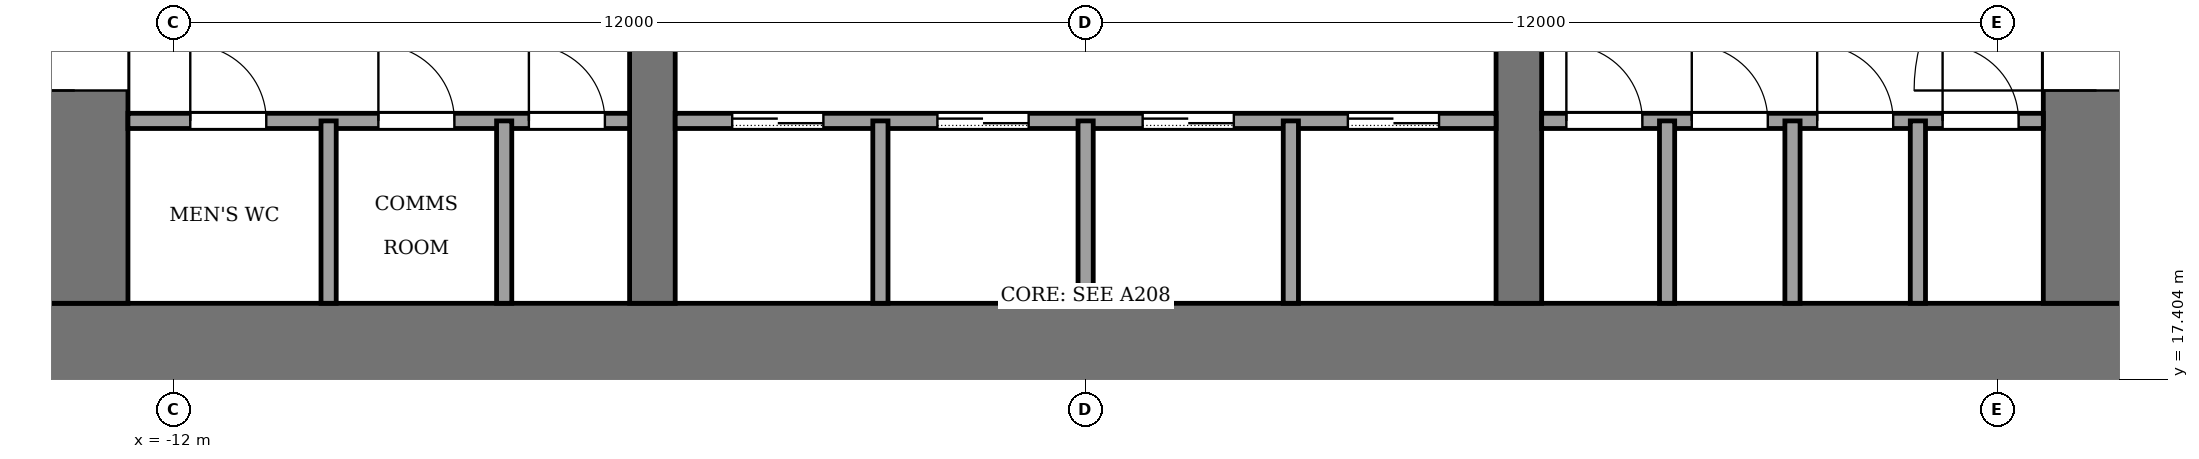
"""IFC4 building model, lengths in metres.
Left out: names, types, materials, properties, quantities, classifications, styles, units other than length and angle.
Written with IfcOpenShell. Run it as: python <this file> out.ifc"""

import sys

from ifc_helpers import new_model, si_unit, direction, frame, frame_2d, origin, place, context, subcontext, project, spatial, rectangle, extrude, element, fill, save


model = new_model("IFC4")
c1 = context("Model", 3, precision=1e-05, world=origin(), true_north=direction((0.0, 1.0)))
c2 = subcontext(c1, "Body", "Model", "MODEL_VIEW")
j1 = project(units=[si_unit("LENGTHUNIT", "METRE"), si_unit("PLANEANGLEUNIT", "RADIAN")], contexts=[c1])
p1 = place(None, origin())
s1 = spatial("IfcSite", under=j1, at=p1, CompositionType="ELEMENT")
p2 = place(p1, origin())
s2 = spatial("IfcBuilding", under=s1, at=p2, CompositionType="ELEMENT")
p3 = place(p2, frame((0.0, 0.0, 42.0)))
s3 = spatial("IfcBuildingStorey", under=s2, at=p3, CompositionType="ELEMENT", Elevation=42.0)
p4 = place(p3, frame((-14.0, 17.7, -0.13), z_axis=(0.0, 0.0, 1.0), x_axis=(1.0, 0.0, 0.0)))
e1 = element("IfcWall", 1, at=p4, inside=s3, PredefinedType="SHEAR", context=c2, shape_type="SweptSolid", body=[
    extrude(rectangle(XDim=28.0, YDim=1.4, at=frame_2d((14.0, 0.0))), origin(), (0.0, 0.0, 1.0), 4.0),
])
p5 = place(p3, frame((-13.3, 18.4, -0.13), z_axis=(0.0, 0.0, 1.0), x_axis=(0.0, 1.0, 0.0)))
e2 = element("IfcWall", 2, at=p5, inside=s3, PredefinedType="SHEAR", context=c2, shape_type="SweptSolid", body=[
    extrude(rectangle(XDim=19.2, YDim=1.4, at=frame_2d((9.6, 0.0))), origin(), (0.0, 0.0, 1.0), 4.0),
])
p6 = place(p5, frame((2.8, 0.0, 0.13)))
e3 = element("IfcOpeningElement", 3, at=p6, cuts=e2, PredefinedType="OPENING", context=c2, shape_type="SweptSolid", body=[
    extrude(rectangle(XDim=2.4, YDim=2.4, at=frame_2d((1.2, 1.2))), frame((0.0, 0.71, 0.0), z_axis=(0.0, -1.0, 0.0), x_axis=(1.0, 0.0, 0.0)), (0.0, 0.0, 1.0), 1.42),
])
p7 = place(p5, frame((13.4, 0.0, 0.13)))
e4 = element("IfcOpeningElement", 4, at=p7, cuts=e2, PredefinedType="OPENING", context=c2, shape_type="SweptSolid", body=[
    extrude(rectangle(XDim=1.4, YDim=2.2, at=frame_2d((0.7, 1.1))), frame((0.0, 0.71, 0.0), z_axis=(0.0, -1.0, 0.0), x_axis=(1.0, 0.0, 0.0)), (0.0, 0.0, 1.0), 1.42),
])
p8 = place(p3, frame((13.3, 18.4, -0.13), z_axis=(0.0, 0.0, 1.0), x_axis=(0.0, 1.0, 0.0)))
e5 = element("IfcWall", 5, at=p8, inside=s3, PredefinedType="SHEAR", context=c2, shape_type="SweptSolid", body=[
    extrude(rectangle(XDim=19.2, YDim=1.4, at=frame_2d((9.6, 0.0))), origin(), (0.0, 0.0, 1.0), 4.0),
])
p9 = place(p8, frame((2.8, 0.0, 0.13)))
e6 = element("IfcOpeningElement", 6, at=p9, cuts=e5, PredefinedType="OPENING", context=c2, shape_type="SweptSolid", body=[
    extrude(rectangle(XDim=2.4, YDim=2.4, at=frame_2d((1.2, 1.2))), frame((0.0, 0.71, 0.0), z_axis=(0.0, -1.0, 0.0), x_axis=(1.0, 0.0, 0.0)), (0.0, 0.0, 1.0), 1.42),
])
p10 = place(p8, frame((13.3, 0.0, 0.13)))
e7 = element("IfcOpeningElement", 7, at=p10, cuts=e5, PredefinedType="OPENING", context=c2, shape_type="SweptSolid", body=[
    extrude(rectangle(XDim=2.4, YDim=2.4, at=frame_2d((1.2, 1.2))), frame((0.0, 0.71, 0.0), z_axis=(0.0, -1.0, 0.0), x_axis=(1.0, 0.0, 0.0)), (0.0, 0.0, 1.0), 1.42),
])
p11 = place(p3, frame((-5.7, 18.4, -0.13), z_axis=(0.0, 0.0, 1.0), x_axis=(0.0, 1.0, 0.0)))
e8 = element("IfcWall", 8, at=p11, inside=s3, PredefinedType="SHEAR", context=c2, shape_type="SweptSolid", body=[
    extrude(rectangle(XDim=19.2, YDim=0.6, at=frame_2d((9.6, 0.0))), origin(), (0.0, 0.0, 1.0), 4.0),
])
p12 = place(p11, frame((8.35, 0.0, 0.13)))
e9 = element("IfcOpeningElement", 9, at=p12, cuts=e8, PredefinedType="OPENING", context=c2, shape_type="SweptSolid", body=[
    extrude(rectangle(XDim=0.9, YDim=2.1, at=frame_2d((0.45, 1.05))), frame((0.0, 0.31, 0.0), z_axis=(0.0, -1.0, 0.0), x_axis=(1.0, 0.0, 0.0)), (0.0, 0.0, 1.0), 0.62),
])
p13 = place(p3, frame((5.7, 18.4, -0.13), z_axis=(0.0, 0.0, 1.0), x_axis=(0.0, 1.0, 0.0)))
e10 = element("IfcWall", 10, at=p13, inside=s3, PredefinedType="SHEAR", context=c2, shape_type="SweptSolid", body=[
    extrude(rectangle(XDim=19.2, YDim=0.6, at=frame_2d((9.6, 0.0))), origin(), (0.0, 0.0, 1.0), 4.0),
])
p14 = place(p13, frame((13.3, 0.0, 0.13)))
e11 = element("IfcOpeningElement", 11, at=p14, cuts=e10, PredefinedType="OPENING", context=c2, shape_type="SweptSolid", body=[
    extrude(rectangle(XDim=2.4, YDim=2.4, at=frame_2d((1.2, 1.2))), frame((0.0, 0.31, 0.0), z_axis=(0.0, -1.0, 0.0), x_axis=(1.0, 0.0, 0.0)), (0.0, 0.0, 1.0), 0.62),
])
p15 = place(p3, frame((-12.6, 20.8, 0.0), z_axis=(0.0, 0.0, 1.0), x_axis=(1.0, 0.0, 0.0)))
e12 = element("IfcWall", 12, at=p15, inside=s3, PredefinedType="PARTITIONING", context=c2, shape_type="SweptSolid", body=[
    extrude(rectangle(XDim=6.6, YDim=0.2, at=frame_2d((3.3, 0.0))), origin(), (0.0, 0.0, 1.0), 3.87),
])
p16 = place(p15, frame((0.82, 0.0, 0.0)))
e13 = element("IfcOpeningElement", 13, at=p16, cuts=e12, PredefinedType="OPENING", context=c2, shape_type="SweptSolid", body=[
    extrude(rectangle(XDim=1.0, YDim=2.1, at=frame_2d((0.5, 1.05))), frame((0.0, 0.11, 0.0), z_axis=(0.0, -1.0, 0.0), x_axis=(1.0, 0.0, 0.0)), (0.0, 0.0, 1.0), 0.22),
])
p17 = place(p15, frame((3.295, 0.0, 0.0)))
e14 = element("IfcOpeningElement", 14, at=p17, cuts=e12, PredefinedType="OPENING", context=c2, shape_type="SweptSolid", body=[
    extrude(rectangle(XDim=1.0, YDim=2.1, at=frame_2d((0.5, 1.05))), frame((0.0, 0.11, 0.0), z_axis=(0.0, -1.0, 0.0), x_axis=(1.0, 0.0, 0.0)), (0.0, 0.0, 1.0), 0.22),
])
p18 = place(p15, frame((5.275, 0.0, 0.0)))
e15 = element("IfcOpeningElement", 15, at=p18, cuts=e12, PredefinedType="OPENING", context=c2, shape_type="SweptSolid", body=[
    extrude(rectangle(XDim=1.0, YDim=2.1, at=frame_2d((0.5, 1.05))), frame((0.0, 0.11, 0.0), z_axis=(0.0, -1.0, 0.0), x_axis=(1.0, 0.0, 0.0)), (0.0, 0.0, 1.0), 0.22),
])
p19 = place(p3, frame((-5.4, 20.8, 0.0), z_axis=(0.0, 0.0, 1.0), x_axis=(1.0, 0.0, 0.0)))
e16 = element("IfcWall", 16, at=p19, inside=s3, PredefinedType="PARTITIONING", context=c2, shape_type="SweptSolid", body=[
    extrude(rectangle(XDim=10.8, YDim=0.2, at=frame_2d((5.4, 0.0))), origin(), (0.0, 0.0, 1.0), 3.87),
])
p20 = place(p19, frame((0.75, 0.0, 0.0)))
e17 = element("IfcOpeningElement", 17, at=p20, cuts=e16, PredefinedType="OPENING", context=c2, shape_type="SweptSolid", body=[
    extrude(rectangle(XDim=1.2, YDim=2.2, at=frame_2d((0.6, 1.1))), frame((0.0, 0.11, 0.0), z_axis=(0.0, -1.0, 0.0), x_axis=(1.0, 0.0, 0.0)), (0.0, 0.0, 1.0), 0.22),
])
p21 = place(p19, frame((3.45, 0.0, 0.0)))
e18 = element("IfcOpeningElement", 18, at=p21, cuts=e16, PredefinedType="OPENING", context=c2, shape_type="SweptSolid", body=[
    extrude(rectangle(XDim=1.2, YDim=2.2, at=frame_2d((0.6, 1.1))), frame((0.0, 0.11, 0.0), z_axis=(0.0, -1.0, 0.0), x_axis=(1.0, 0.0, 0.0)), (0.0, 0.0, 1.0), 0.22),
])
p22 = place(p19, frame((6.15, 0.0, 0.0)))
e19 = element("IfcOpeningElement", 19, at=p22, cuts=e16, PredefinedType="OPENING", context=c2, shape_type="SweptSolid", body=[
    extrude(rectangle(XDim=1.2, YDim=2.2, at=frame_2d((0.6, 1.1))), frame((0.0, 0.11, 0.0), z_axis=(0.0, -1.0, 0.0), x_axis=(1.0, 0.0, 0.0)), (0.0, 0.0, 1.0), 0.22),
])
p23 = place(p19, frame((8.85, 0.0, 0.0)))
e20 = element("IfcOpeningElement", 20, at=p23, cuts=e16, PredefinedType="OPENING", context=c2, shape_type="SweptSolid", body=[
    extrude(rectangle(XDim=1.2, YDim=2.2, at=frame_2d((0.6, 1.1))), frame((0.0, 0.11, 0.0), z_axis=(0.0, -1.0, 0.0), x_axis=(1.0, 0.0, 0.0)), (0.0, 0.0, 1.0), 0.22),
])
p24 = place(p3, frame((6.0, 20.8, 0.0), z_axis=(0.0, 0.0, 1.0), x_axis=(1.0, 0.0, 0.0)))
e21 = element("IfcWall", 21, at=p24, inside=s3, PredefinedType="PARTITIONING", context=c2, shape_type="SweptSolid", body=[
    extrude(rectangle(XDim=6.6, YDim=0.2, at=frame_2d((3.3, 0.0))), origin(), (0.0, 0.0, 1.0), 3.87),
])
p25 = place(p24, frame((0.325, 0.0, 0.0)))
e22 = element("IfcOpeningElement", 22, at=p25, cuts=e21, PredefinedType="OPENING", context=c2, shape_type="SweptSolid", body=[
    extrude(rectangle(XDim=1.0, YDim=2.1, at=frame_2d((0.5, 1.05))), frame((0.0, 0.11, 0.0), z_axis=(0.0, -1.0, 0.0), x_axis=(1.0, 0.0, 0.0)), (0.0, 0.0, 1.0), 0.22),
])
p26 = place(p24, frame((1.975, 0.0, 0.0)))
e23 = element("IfcOpeningElement", 23, at=p26, cuts=e21, PredefinedType="OPENING", context=c2, shape_type="SweptSolid", body=[
    extrude(rectangle(XDim=1.0, YDim=2.1, at=frame_2d((0.5, 1.05))), frame((0.0, 0.11, 0.0), z_axis=(0.0, -1.0, 0.0), x_axis=(1.0, 0.0, 0.0)), (0.0, 0.0, 1.0), 0.22),
])
p27 = place(p24, frame((3.625, 0.0, 0.0)))
e24 = element("IfcOpeningElement", 24, at=p27, cuts=e21, PredefinedType="OPENING", context=c2, shape_type="SweptSolid", body=[
    extrude(rectangle(XDim=1.0, YDim=2.1, at=frame_2d((0.5, 1.05))), frame((0.0, 0.11, 0.0), z_axis=(0.0, -1.0, 0.0), x_axis=(1.0, 0.0, 0.0)), (0.0, 0.0, 1.0), 0.22),
])
p28 = place(p24, frame((5.275, 0.0, 0.0)))
e25 = element("IfcOpeningElement", 25, at=p28, cuts=e21, PredefinedType="OPENING", context=c2, shape_type="SweptSolid", body=[
    extrude(rectangle(XDim=1.0, YDim=2.1, at=frame_2d((0.5, 1.05))), frame((0.0, 0.11, 0.0), z_axis=(0.0, -1.0, 0.0), x_axis=(1.0, 0.0, 0.0)), (0.0, 0.0, 1.0), 0.22),
])
for number, where, z_axis, x_axis in (
    (26, (-9.96, 18.4, 0.0), (0.0, 0.0, 1.0), (0.0, 1.0, 0.0)),
    (27, (-7.65, 18.4, 0.0), (0.0, 0.0, 1.0), (0.0, 1.0, 0.0)),
    (28, (-2.7, 18.4, 0.0), (0.0, 0.0, 1.0), (0.0, 1.0, 0.0)),
    (29, (0.0, 18.4, 0.0), (0.0, 0.0, 1.0), (0.0, 1.0, 0.0)),
    (30, (2.7, 18.4, 0.0), (0.0, 0.0, 1.0), (0.0, 1.0, 0.0)),
    (31, (7.65, 18.4, 0.0), (0.0, 0.0, 1.0), (0.0, 1.0, 0.0)),
    (32, (9.3, 18.4, 0.0), (0.0, 0.0, 1.0), (0.0, 1.0, 0.0)),
    (33, (10.95, 18.4, 0.0), (0.0, 0.0, 1.0), (0.0, 1.0, 0.0)),
):
    element("IfcWall", number, at=place(p3, frame(where, z_axis=z_axis, x_axis=x_axis)), inside=s3, PredefinedType="PARTITIONING", context=c2, shape_type="SweptSolid", body=[
        extrude(rectangle(XDim=2.4, YDim=0.2, at=frame_2d((1.2, 0.0))), origin(), (0.0, 0.0, 1.0), 3.87),
    ])
p29 = place(p20, origin())
e34 = element("IfcDoor", 34, at=p29, inside=s3, OperationType="SLIDING_TO_LEFT", PredefinedType="DOOR", context=c2, shape_type="SweptSolid", body=[
    extrude(rectangle(XDim=1.2, YDim=2.2, at=frame_2d((0.6, 1.1))), frame((0.0, 0.025, 0.0), z_axis=(0.0, -1.0, 0.0), x_axis=(1.0, 0.0, 0.0)), (0.0, 0.0, 1.0), 0.05),
])
fill(e17, e34)
p30 = place(p21, origin())
e35 = element("IfcDoor", 35, at=p30, inside=s3, OperationType="SLIDING_TO_LEFT", PredefinedType="DOOR", context=c2, shape_type="SweptSolid", body=[
    extrude(rectangle(XDim=1.2, YDim=2.2, at=frame_2d((0.6, 1.1))), frame((0.0, 0.025, 0.0), z_axis=(0.0, -1.0, 0.0), x_axis=(1.0, 0.0, 0.0)), (0.0, 0.0, 1.0), 0.05),
])
fill(e18, e35)
p31 = place(p22, origin())
e36 = element("IfcDoor", 36, at=p31, inside=s3, OperationType="SLIDING_TO_LEFT", PredefinedType="DOOR", context=c2, shape_type="SweptSolid", body=[
    extrude(rectangle(XDim=1.2, YDim=2.2, at=frame_2d((0.6, 1.1))), frame((0.0, 0.025, 0.0), z_axis=(0.0, -1.0, 0.0), x_axis=(1.0, 0.0, 0.0)), (0.0, 0.0, 1.0), 0.05),
])
fill(e19, e36)
p32 = place(p23, origin())
e37 = element("IfcDoor", 37, at=p32, inside=s3, OperationType="SLIDING_TO_LEFT", PredefinedType="DOOR", context=c2, shape_type="SweptSolid", body=[
    extrude(rectangle(XDim=1.2, YDim=2.2, at=frame_2d((0.6, 1.1))), frame((0.0, 0.025, 0.0), z_axis=(0.0, -1.0, 0.0), x_axis=(1.0, 0.0, 0.0)), (0.0, 0.0, 1.0), 0.05),
])
fill(e20, e37)
p33 = place(p16, origin())
e38 = element("IfcDoor", 38, at=p33, inside=s3, OperationType="SINGLE_SWING_LEFT", PredefinedType="DOOR", context=c2, shape_type="SweptSolid", body=[
    extrude(rectangle(XDim=1.0, YDim=2.1, at=frame_2d((0.5, 1.05))), frame((0.0, 0.025, 0.0), z_axis=(0.0, -1.0, 0.0), x_axis=(1.0, 0.0, 0.0)), (0.0, 0.0, 1.0), 0.05),
])
fill(e13, e38)
p34 = place(p17, origin())
e39 = element("IfcDoor", 39, at=p34, inside=s3, OperationType="SINGLE_SWING_LEFT", PredefinedType="DOOR", context=c2, shape_type="SweptSolid", body=[
    extrude(rectangle(XDim=1.0, YDim=2.1, at=frame_2d((0.5, 1.05))), frame((0.0, 0.025, 0.0), z_axis=(0.0, -1.0, 0.0), x_axis=(1.0, 0.0, 0.0)), (0.0, 0.0, 1.0), 0.05),
])
fill(e14, e39)
p35 = place(p18, origin())
e40 = element("IfcDoor", 40, at=p35, inside=s3, OperationType="SINGLE_SWING_RIGHT", PredefinedType="DOOR", context=c2, shape_type="SweptSolid", body=[
    extrude(rectangle(XDim=1.0, YDim=2.1, at=frame_2d((0.5, 1.05))), frame((0.0, 0.025, 0.0), z_axis=(0.0, -1.0, 0.0), x_axis=(1.0, 0.0, 0.0)), (0.0, 0.0, 1.0), 0.05),
])
fill(e15, e40)
p36 = place(p25, origin())
e41 = element("IfcDoor", 41, at=p36, inside=s3, OperationType="SINGLE_SWING_LEFT", PredefinedType="DOOR", context=c2, shape_type="SweptSolid", body=[
    extrude(rectangle(XDim=1.0, YDim=2.1, at=frame_2d((0.5, 1.05))), frame((0.0, 0.025, 0.0), z_axis=(0.0, -1.0, 0.0), x_axis=(1.0, 0.0, 0.0)), (0.0, 0.0, 1.0), 0.05),
])
fill(e22, e41)
p37 = place(p26, origin())
e42 = element("IfcDoor", 42, at=p37, inside=s3, OperationType="SINGLE_SWING_LEFT", PredefinedType="DOOR", context=c2, shape_type="SweptSolid", body=[
    extrude(rectangle(XDim=1.0, YDim=2.1, at=frame_2d((0.5, 1.05))), frame((0.0, 0.025, 0.0), z_axis=(0.0, -1.0, 0.0), x_axis=(1.0, 0.0, 0.0)), (0.0, 0.0, 1.0), 0.05),
])
fill(e23, e42)
p38 = place(p27, origin())
e43 = element("IfcDoor", 43, at=p38, inside=s3, OperationType="SINGLE_SWING_RIGHT", PredefinedType="DOOR", context=c2, shape_type="SweptSolid", body=[
    extrude(rectangle(XDim=1.0, YDim=2.1, at=frame_2d((0.5, 1.05))), frame((0.0, 0.025, 0.0), z_axis=(0.0, -1.0, 0.0), x_axis=(1.0, 0.0, 0.0)), (0.0, 0.0, 1.0), 0.05),
])
fill(e24, e43)
p39 = place(p28, origin())
e44 = element("IfcDoor", 44, at=p39, inside=s3, OperationType="SINGLE_SWING_RIGHT", PredefinedType="DOOR", context=c2, shape_type="SweptSolid", body=[
    extrude(rectangle(XDim=1.0, YDim=2.1, at=frame_2d((0.5, 1.05))), frame((0.0, 0.025, 0.0), z_axis=(0.0, -1.0, 0.0), x_axis=(1.0, 0.0, 0.0)), (0.0, 0.0, 1.0), 0.05),
])
fill(e25, e44)
p40 = place(p6, origin())
e45 = element("IfcDoor", 45, at=p40, inside=s3, OperationType="DOUBLE_DOOR_SINGLE_SWING", PredefinedType="DOOR", context=c2, shape_type="SweptSolid", body=[
    extrude(rectangle(XDim=2.4, YDim=2.4, at=frame_2d((1.2, 1.2))), frame((0.0, 0.025, 0.0), z_axis=(0.0, -1.0, 0.0), x_axis=(1.0, 0.0, 0.0)), (0.0, 0.0, 1.0), 0.05),
])
fill(e3, e45)
p41 = place(p9, origin())
e46 = element("IfcDoor", 46, at=p41, inside=s3, OperationType="DOUBLE_DOOR_SINGLE_SWING", PredefinedType="DOOR", context=c2, shape_type="SweptSolid", body=[
    extrude(rectangle(XDim=2.4, YDim=2.4, at=frame_2d((1.2, 1.2))), frame((0.0, 0.025, 0.0), z_axis=(0.0, -1.0, 0.0), x_axis=(1.0, 0.0, 0.0)), (0.0, 0.0, 1.0), 0.05),
])
fill(e6, e46)
save(model, sys.argv[1])
